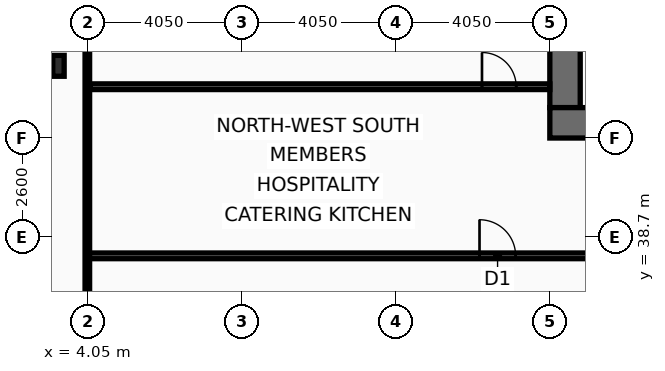
"""IFC4 building model, lengths in metres.
Left out: names, types, materials, properties, quantities, classifications, styles, units other than length and angle.
Written with IfcOpenShell. Run it as: python <this file> out.ifc"""

import sys

from ifc_helpers import new_model, si_unit, direction, frame, frame_2d, origin, origin_2d, place, context, subcontext, project, spatial, rectangle, i_section, extrude, element, fill, save


model = new_model("IFC4")
c1 = context("Model", 3, precision=1e-05, world=origin(), true_north=direction((0.0, 1.0)))
c2 = subcontext(c1, "Body", "Model", "MODEL_VIEW")
j1 = project(units=[si_unit("LENGTHUNIT", "METRE"), si_unit("PLANEANGLEUNIT", "RADIAN")], contexts=[c1])
p1 = place(None, origin())
s1 = spatial("IfcSite", under=j1, at=p1, CompositionType="ELEMENT")
p2 = place(p1, origin())
s2 = spatial("IfcBuilding", under=s1, at=p2, CompositionType="ELEMENT")
p3 = place(p2, frame((0.0, 0.0, 81.8)))
s3 = spatial("IfcBuildingStorey", under=s2, at=p3, CompositionType="ELEMENT", Elevation=81.8)
p4 = place(p3, frame((16.6, 42.1, 0.0), z_axis=(0.0, 0.0, 1.0), x_axis=(0.0, 1.0, 0.0)))
e1 = element("IfcWall", 1, at=p4, inside=s3, PredefinedType="SHEAR", context=c2, shape_type="SweptSolid", body=[
    extrude(rectangle(XDim=10.8, YDim=0.8, at=frame_2d((5.4, 0.0))), origin(), (0.0, 0.0, 1.0), 3.78),
])
p5 = place(p3, frame((18.65, 41.7, 0.0), z_axis=(0.0, 0.0, 1.0), x_axis=(-1.0, 0.0, 0.0)))
e2 = element("IfcWall", 2, at=p5, inside=s3, PredefinedType="SHEAR", context=c2, shape_type="SweptSolid", body=[
    extrude(rectangle(XDim=2.45, YDim=0.8, at=frame_2d((1.225, 0.0))), origin(), (0.0, 0.0, 1.0), 3.78),
])
p6 = place(p3, frame((3.27, 43.2, 0.0), z_axis=(0.0, 0.0, 1.0), x_axis=(1.0, 0.0, 0.0)))
e3 = element("IfcColumn", 3, at=p6, inside=s3, PredefinedType="COLUMN", context=c2, shape_type="SweptSolid", body=[
    extrude(i_section(OverallWidth=0.3, OverallDepth=0.55, WebThickness=0.015, FlangeThickness=0.029, at=origin_2d()), origin(), (0.0, 0.0, 1.0), 4.0),
])
p7 = place(p3, frame((4.03, 38.2, 0.0), z_axis=(0.0, 0.0, 1.0), x_axis=(1.0, 0.0, 0.0)))
e4 = element("IfcWall", 4, at=p7, inside=s3, PredefinedType="PARTITIONING", context=c2, shape_type="SweptSolid", body=[
    extrude(rectangle(XDim=14.52, YDim=0.15, at=frame_2d((7.26, 0.0))), origin(), (0.0, 0.0, 1.0), 2.97),
])
p8 = place(p7, frame((10.32, 0.0, 0.0)))
e5 = element("IfcOpeningElement", 5, at=p8, cuts=e4, PredefinedType="OPENING", context=c2, shape_type="SweptSolid", body=[
    extrude(rectangle(XDim=0.95, YDim=2.05, at=frame_2d((0.475, 1.025))), frame((0.0, 0.085, 0.0), z_axis=(0.0, -1.0, 0.0), x_axis=(1.0, 0.0, 0.0)), (0.0, 0.0, 1.0), 0.17),
])
p9 = place(p3, frame((4.095, 42.65, 0.0), z_axis=(0.0, 0.0, 1.0), x_axis=(1.0, 0.0, 0.0)))
e6 = element("IfcWall", 6, at=p9, inside=s3, PredefinedType="PARTITIONING", context=c2, shape_type="SweptSolid", body=[
    extrude(rectangle(XDim=12.105, YDim=0.15, at=frame_2d((6.052, 0.0))), origin(), (0.0, 0.0, 1.0), 2.97),
])
p10 = place(p9, frame((10.32, 0.0, 0.0)))
e7 = element("IfcOpeningElement", 7, at=p10, cuts=e6, PredefinedType="OPENING", context=c2, shape_type="SweptSolid", body=[
    extrude(rectangle(XDim=0.9, YDim=2.05, at=frame_2d((0.45, 1.025))), frame((0.0, 0.085, 0.0), z_axis=(0.0, -1.0, 0.0), x_axis=(1.0, 0.0, 0.0)), (0.0, 0.0, 1.0), 0.17),
])
p11 = place(p3, frame((4.03, 10.665, 0.0), z_axis=(0.0, 0.0, 1.0), x_axis=(0.0, 1.0, 0.0)))
e8 = element("IfcWall", 8, at=p11, inside=s3, PredefinedType="PARTITIONING", context=c2, shape_type="SweptSolid", body=[
    extrude(rectangle(XDim=42.11, YDim=0.12, at=frame_2d((21.055, 0.0))), origin(), (0.0, 0.0, 1.0), 2.97),
])
p12 = place(p8, origin())
e9 = element("IfcDoor", 9, at=p12, inside=s3, OperationType="SINGLE_SWING_LEFT", PredefinedType="DOOR", context=c2, shape_type="SweptSolid", body=[
    extrude(rectangle(XDim=0.95, YDim=2.05, at=frame_2d((0.475, 1.025))), frame((0.0, 0.025, 0.0), z_axis=(0.0, -1.0, 0.0), x_axis=(1.0, 0.0, 0.0)), (0.0, 0.0, 1.0), 0.05),
])
fill(e5, e9)
p13 = place(p10, origin())
e10 = element("IfcDoor", 10, at=p13, inside=s3, OperationType="SINGLE_SWING_LEFT", PredefinedType="DOOR", context=c2, shape_type="SweptSolid", body=[
    extrude(rectangle(XDim=0.9, YDim=2.05, at=frame_2d((0.45, 1.025))), frame((0.0, 0.025, 0.0), z_axis=(0.0, -1.0, 0.0), x_axis=(1.0, 0.0, 0.0)), (0.0, 0.0, 1.0), 0.05),
])
fill(e7, e10)
save(model, sys.argv[1])
